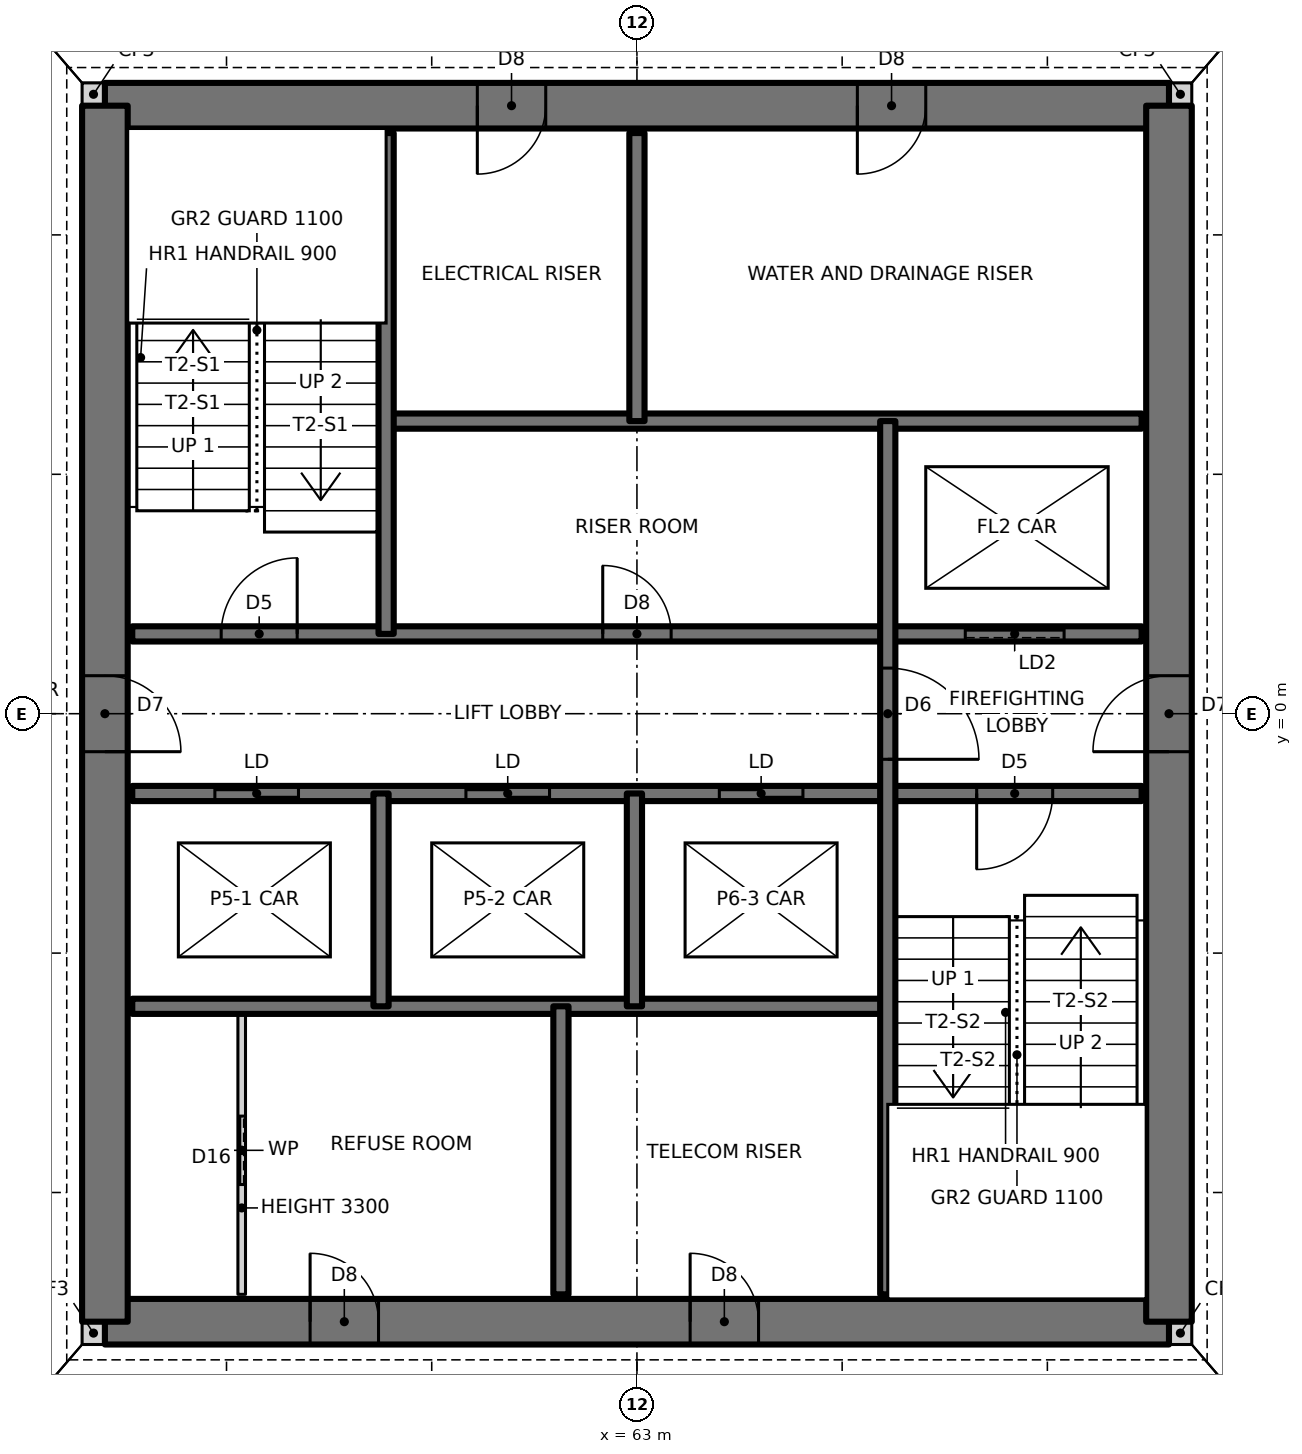
"""IFC4 building model, lengths in metres.
Left out: names, types, materials, properties, quantities, classifications, styles, units other than length and angle.
Written with IfcOpenShell. Run it as: python <this file> out.ifc"""

import sys

from ifc_helpers import new_model, si_unit, direction, frame, frame_2d, origin, place, context, subcontext, project, spatial, rectangle, extrude, element, fill, save


model = new_model("IFC4")
c1 = context("Model", 3, precision=1e-05, world=origin(), true_north=direction((0.0, 1.0)))
c2 = subcontext(c1, "Body", "Model", "MODEL_VIEW")
j1 = project(units=[si_unit("LENGTHUNIT", "METRE"), si_unit("PLANEANGLEUNIT", "RADIAN")], contexts=[c1])
p1 = place(None, origin())
s1 = spatial("IfcSite", under=j1, at=p1, CompositionType="ELEMENT")
p2 = place(p1, origin())
s2 = spatial("IfcBuilding", under=s1, at=p2, CompositionType="ELEMENT")
p3 = place(p2, frame((0.0, 0.0, 15.0)))
s3 = spatial("IfcBuildingStorey", under=s2, at=p3, CompositionType="ELEMENT", Elevation=15.0)
for number, where, z_axis, x_axis in (
    (1, (55.7, -8.15, 0.0), (0.0, 0.0, 1.0), (1.0, 0.0, 0.0)),
    (2, (70.0, -8.15, 0.0), (0.0, 0.0, 1.0), (1.0, 0.0, 0.0)),
    (3, (70.0, 8.15, 0.0), (0.0, 0.0, 1.0), (1.0, 0.0, 0.0)),
    (4, (55.7, 8.15, 0.0), (0.0, 0.0, 1.0), (1.0, 0.0, 0.0)),
):
    element("IfcWall", number, at=place(p3, frame(where, z_axis=z_axis, x_axis=x_axis)), inside=s3, PredefinedType="SOLIDWALL", context=c2, shape_type="SweptSolid", body=[
        extrude(rectangle(XDim=0.3, YDim=0.3, at=frame_2d((0.15, 0.0))), origin(), (0.0, 0.0, 1.0), 3.5),
    ])
p4 = place(p3, frame((56.0, -8.0, 0.0), z_axis=(0.0, 0.0, 1.0), x_axis=(1.0, 0.0, 0.0)))
e5 = element("IfcWall", 5, at=p4, inside=s3, PredefinedType="SHEAR", context=c2, shape_type="SweptSolid", body=[
    extrude(rectangle(XDim=14.0, YDim=0.6, at=frame_2d((7.0, 0.0))), origin(), (0.0, 0.0, 1.0), 3.5),
])
p5 = place(p4, frame((2.7, 0.0, 0.0)))
e6 = element("IfcOpeningElement", 6, at=p5, cuts=e5, PredefinedType="OPENING", context=c2, shape_type="SweptSolid", body=[
    extrude(rectangle(XDim=0.9, YDim=2.1, at=frame_2d((0.45, 1.05))), frame((0.0, 0.31, 0.0), z_axis=(0.0, -1.0, 0.0), x_axis=(1.0, 0.0, 0.0)), (0.0, 0.0, 1.0), 0.62),
])
p6 = place(p4, frame((7.7, 0.0, 0.0)))
e7 = element("IfcOpeningElement", 7, at=p6, cuts=e5, PredefinedType="OPENING", context=c2, shape_type="SweptSolid", body=[
    extrude(rectangle(XDim=0.9, YDim=2.1, at=frame_2d((0.45, 1.05))), frame((0.0, 0.31, 0.0), z_axis=(0.0, -1.0, 0.0), x_axis=(1.0, 0.0, 0.0)), (0.0, 0.0, 1.0), 0.62),
])
p7 = place(p3, frame((70.0, 8.0, 0.0), z_axis=(0.0, 0.0, 1.0), x_axis=(-1.0, 0.0, 0.0)))
e8 = element("IfcWall", 8, at=p7, inside=s3, PredefinedType="SHEAR", context=c2, shape_type="SweptSolid", body=[
    extrude(rectangle(XDim=14.0, YDim=0.6, at=frame_2d((7.0, 0.0))), origin(), (0.0, 0.0, 1.0), 3.5),
])
p8 = place(p7, frame((8.2, 0.0, 0.0)))
e9 = element("IfcOpeningElement", 9, at=p8, cuts=e8, PredefinedType="OPENING", context=c2, shape_type="SweptSolid", body=[
    extrude(rectangle(XDim=0.9, YDim=2.1, at=frame_2d((0.45, 1.05))), frame((0.0, 0.31, 0.0), z_axis=(0.0, -1.0, 0.0), x_axis=(1.0, 0.0, 0.0)), (0.0, 0.0, 1.0), 0.62),
])
p9 = place(p7, frame((3.2, 0.0, 0.0)))
e10 = element("IfcOpeningElement", 10, at=p9, cuts=e8, PredefinedType="OPENING", context=c2, shape_type="SweptSolid", body=[
    extrude(rectangle(XDim=0.9, YDim=2.1, at=frame_2d((0.45, 1.05))), frame((0.0, 0.31, 0.0), z_axis=(0.0, -1.0, 0.0), x_axis=(1.0, 0.0, 0.0)), (0.0, 0.0, 1.0), 0.62),
])
p10 = place(p3, frame((70.0, -8.0, 0.0), z_axis=(0.0, 0.0, 1.0), x_axis=(0.0, 1.0, 0.0)))
e11 = element("IfcWall", 11, at=p10, inside=s3, PredefinedType="SHEAR", context=c2, shape_type="SweptSolid", body=[
    extrude(rectangle(XDim=16.0, YDim=0.6, at=frame_2d((8.0, 0.0))), origin(), (0.0, 0.0, 1.0), 3.5),
])
p11 = place(p10, frame((7.5, 0.0, 0.0)))
e12 = element("IfcOpeningElement", 12, at=p11, cuts=e11, PredefinedType="OPENING", context=c2, shape_type="SweptSolid", body=[
    extrude(rectangle(XDim=1.0, YDim=2.1, at=frame_2d((0.5, 1.05))), frame((0.0, 0.31, 0.0), z_axis=(0.0, -1.0, 0.0), x_axis=(1.0, 0.0, 0.0)), (0.0, 0.0, 1.0), 0.62),
])
p12 = place(p3, frame((56.0, 8.0, 0.0), z_axis=(0.0, 0.0, 1.0), x_axis=(0.0, -1.0, 0.0)))
e13 = element("IfcWall", 13, at=p12, inside=s3, PredefinedType="SHEAR", context=c2, shape_type="SweptSolid", body=[
    extrude(rectangle(XDim=16.0, YDim=0.6, at=frame_2d((8.0, 0.0))), origin(), (0.0, 0.0, 1.0), 3.5),
])
p13 = place(p12, frame((7.5, 0.0, 0.0)))
e14 = element("IfcOpeningElement", 14, at=p13, cuts=e13, PredefinedType="OPENING", context=c2, shape_type="SweptSolid", body=[
    extrude(rectangle(XDim=1.0, YDim=2.1, at=frame_2d((0.5, 1.05))), frame((0.0, 0.31, 0.0), z_axis=(0.0, -1.0, 0.0), x_axis=(1.0, 0.0, 0.0)), (0.0, 0.0, 1.0), 0.62),
])
p14 = place(p3, frame((56.36, -3.85, 0.0), z_axis=(0.0, 0.0, 1.0), x_axis=(1.0, 0.0, 0.0)))
e15 = element("IfcWall", 15, at=p14, inside=s3, PredefinedType="SOLIDWALL", context=c2, shape_type="SweptSolid", body=[
    extrude(rectangle(XDim=9.94, YDim=0.2, at=frame_2d((4.97, 0.0))), origin(), (0.0, 0.0, 1.0), 3.5),
])
p15 = place(p3, frame((56.36, -1.05, 0.0), z_axis=(0.0, 0.0, 1.0), x_axis=(1.0, 0.0, 0.0)))
e16 = element("IfcWall", 16, at=p15, inside=s3, PredefinedType="SOLIDWALL", context=c2, shape_type="SweptSolid", body=[
    extrude(rectangle(XDim=13.28, YDim=0.2, at=frame_2d((6.64, 0.0))), origin(), (0.0, 0.0, 1.0), 3.5),
])
p16 = place(p15, frame((11.11, 0.0, 0.0)))
e17 = element("IfcOpeningElement", 17, at=p16, cuts=e16, PredefinedType="OPENING", context=c2, shape_type="SweptSolid", body=[
    extrude(rectangle(XDim=1.0, YDim=2.1, at=frame_2d((0.5, 1.05))), frame((0.0, 0.11, 0.0), z_axis=(0.0, -1.0, 0.0), x_axis=(1.0, 0.0, 0.0)), (0.0, 0.0, 1.0), 0.22),
])
p17 = place(p15, frame((1.087, 0.0, 0.0)))
e18 = element("IfcOpeningElement", 18, at=p17, cuts=e16, PredefinedType="OPENING", context=c2, shape_type="SweptSolid", body=[
    extrude(rectangle(XDim=1.1, YDim=2.1, at=frame_2d((0.55, 1.05))), frame((0.0, 0.11, 0.0), z_axis=(0.0, -1.0, 0.0), x_axis=(1.0, 0.0, 0.0)), (0.0, 0.0, 1.0), 0.22),
])
p18 = place(p15, frame((4.39, 0.0, 0.0)))
e19 = element("IfcOpeningElement", 19, at=p18, cuts=e16, PredefinedType="OPENING", context=c2, shape_type="SweptSolid", body=[
    extrude(rectangle(XDim=1.1, YDim=2.1, at=frame_2d((0.55, 1.05))), frame((0.0, 0.11, 0.0), z_axis=(0.0, -1.0, 0.0), x_axis=(1.0, 0.0, 0.0)), (0.0, 0.0, 1.0), 0.22),
])
p19 = place(p15, frame((7.724, 0.0, 0.0)))
e20 = element("IfcOpeningElement", 20, at=p19, cuts=e16, PredefinedType="OPENING", context=c2, shape_type="SweptSolid", body=[
    extrude(rectangle(XDim=1.1, YDim=2.1, at=frame_2d((0.55, 1.05))), frame((0.0, 0.11, 0.0), z_axis=(0.0, -1.0, 0.0), x_axis=(1.0, 0.0, 0.0)), (0.0, 0.0, 1.0), 0.22),
])
p20 = place(p3, frame((56.36, 1.05, 0.0), z_axis=(0.0, 0.0, 1.0), x_axis=(1.0, 0.0, 0.0)))
e21 = element("IfcWall", 21, at=p20, inside=s3, PredefinedType="SOLIDWALL", context=c2, shape_type="SweptSolid", body=[
    extrude(rectangle(XDim=13.28, YDim=0.2, at=frame_2d((6.64, 0.0))), origin(), (0.0, 0.0, 1.0), 3.5),
])
p21 = place(p20, frame((1.17, 0.0, 0.0)))
e22 = element("IfcOpeningElement", 22, at=p21, cuts=e21, PredefinedType="OPENING", context=c2, shape_type="SweptSolid", body=[
    extrude(rectangle(XDim=1.0, YDim=2.1, at=frame_2d((0.5, 1.05))), frame((0.0, 0.11, 0.0), z_axis=(0.0, -1.0, 0.0), x_axis=(1.0, 0.0, 0.0)), (0.0, 0.0, 1.0), 0.22),
])
p22 = place(p20, frame((6.19, 0.0, 0.0)))
e23 = element("IfcOpeningElement", 23, at=p22, cuts=e21, PredefinedType="OPENING", context=c2, shape_type="SweptSolid", body=[
    extrude(rectangle(XDim=0.9, YDim=2.1, at=frame_2d((0.45, 1.05))), frame((0.0, 0.11, 0.0), z_axis=(0.0, -1.0, 0.0), x_axis=(1.0, 0.0, 0.0)), (0.0, 0.0, 1.0), 0.22),
])
p23 = place(p20, frame((10.96, 0.0, 0.0)))
e24 = element("IfcOpeningElement", 24, at=p23, cuts=e21, PredefinedType="OPENING", context=c2, shape_type="SweptSolid", body=[
    extrude(rectangle(XDim=1.3, YDim=2.1, at=frame_2d((0.65, 1.05))), frame((0.0, 0.11, 0.0), z_axis=(0.0, -1.0, 0.0), x_axis=(1.0, 0.0, 0.0)), (0.0, 0.0, 1.0), 0.22),
])
p24 = place(p3, frame((59.7, 3.85, 0.0), z_axis=(0.0, 0.0, 1.0), x_axis=(1.0, 0.0, 0.0)))
e25 = element("IfcWall", 25, at=p24, inside=s3, PredefinedType="SOLIDWALL", context=c2, shape_type="SweptSolid", body=[
    extrude(rectangle(XDim=9.94, YDim=0.2, at=frame_2d((4.97, 0.0))), origin(), (0.0, 0.0, 1.0), 3.5),
])
p25 = place(p3, frame((66.3, -7.64, 0.0), z_axis=(0.0, 0.0, 1.0), x_axis=(0.0, 1.0, 0.0)))
e26 = element("IfcWall", 26, at=p25, inside=s3, PredefinedType="SOLIDWALL", context=c2, shape_type="SweptSolid", body=[
    extrude(rectangle(XDim=11.49, YDim=0.2, at=frame_2d((5.745, 0.0))), origin(), (0.0, 0.0, 1.0), 3.5),
])
p26 = place(p25, frame((7.04, 0.0, 0.0)))
e27 = element("IfcOpeningElement", 27, at=p26, cuts=e26, PredefinedType="OPENING", context=c2, shape_type="SweptSolid", body=[
    extrude(rectangle(XDim=1.2, YDim=2.1, at=frame_2d((0.6, 1.05))), frame((0.0, 0.11, 0.0), z_axis=(0.0, -1.0, 0.0), x_axis=(1.0, 0.0, 0.0)), (0.0, 0.0, 1.0), 0.22),
])
p27 = place(p3, frame((63.0, 3.85, 0.0), z_axis=(0.0, 0.0, 1.0), x_axis=(0.0, 1.0, 0.0)))
e28 = element("IfcWall", 28, at=p27, inside=s3, PredefinedType="SOLIDWALL", context=c2, shape_type="SweptSolid", body=[
    extrude(rectangle(XDim=3.79, YDim=0.2, at=frame_2d((1.895, 0.0))), origin(), (0.0, 0.0, 1.0), 3.5),
])
p28 = place(p3, frame((62.967, -3.85, 0.0), z_axis=(0.0, 0.0, 1.0), x_axis=(0.0, 1.0, 0.0)))
e29 = element("IfcWall", 29, at=p28, inside=s3, PredefinedType="SOLIDWALL", context=c2, shape_type="SweptSolid", body=[
    extrude(rectangle(XDim=2.8, YDim=0.2, at=frame_2d((1.4, 0.0))), origin(), (0.0, 0.0, 1.0), 3.5),
])
p29 = place(p3, frame((62.0, -7.64, 0.0), z_axis=(0.0, 0.0, 1.0), x_axis=(0.0, 1.0, 0.0)))
e30 = element("IfcWall", 30, at=p29, inside=s3, PredefinedType="SOLIDWALL", context=c2, shape_type="SweptSolid", body=[
    extrude(rectangle(XDim=3.79, YDim=0.2, at=frame_2d((1.895, 0.0))), origin(), (0.0, 0.0, 1.0), 3.5),
])
p30 = place(p3, frame((59.7, 1.05, 0.0), z_axis=(0.0, 0.0, 1.0), x_axis=(0.0, 1.0, 0.0)))
e31 = element("IfcWall", 31, at=p30, inside=s3, PredefinedType="SOLIDWALL", context=c2, shape_type="SweptSolid", body=[
    extrude(rectangle(XDim=6.59, YDim=0.2, at=frame_2d((3.295, 0.0))), origin(), (0.0, 0.0, 1.0), 3.5),
])
p31 = place(p3, frame((59.633, -3.85, 0.0), z_axis=(0.0, 0.0, 1.0), x_axis=(0.0, 1.0, 0.0)))
e32 = element("IfcWall", 32, at=p31, inside=s3, PredefinedType="SOLIDWALL", context=c2, shape_type="SweptSolid", body=[
    extrude(rectangle(XDim=2.8, YDim=0.2, at=frame_2d((1.4, 0.0))), origin(), (0.0, 0.0, 1.0), 3.5),
])
p32 = place(p3, frame((57.8, -7.64, 0.0), z_axis=(0.0, 0.0, 1.0), x_axis=(0.0, 1.0, 0.0)))
e33 = element("IfcWall", 33, at=p32, inside=s3, PredefinedType="PARTITIONING", context=c2, shape_type="SweptSolid", body=[
    extrude(rectangle(XDim=3.79, YDim=0.1, at=frame_2d((1.895, 0.0))), origin(), (0.0, 0.0, 1.0), 3.3),
])
p33 = place(p32, frame((1.445, 0.0, 0.0)))
e34 = element("IfcOpeningElement", 34, at=p33, cuts=e33, PredefinedType="OPENING", context=c2, shape_type="SweptSolid", body=[
    extrude(rectangle(XDim=0.9, YDim=2.1, at=frame_2d((0.45, 1.05))), frame((0.0, 0.06, 0.0), z_axis=(0.0, -1.0, 0.0), x_axis=(1.0, 0.0, 0.0)), (0.0, 0.0, 1.0), 0.12),
])
p34 = place(p21, origin())
e35 = element("IfcDoor", 35, at=p34, inside=s3, OperationType="SINGLE_SWING_RIGHT", PredefinedType="DOOR", context=c2, shape_type="SweptSolid", body=[
    extrude(rectangle(XDim=1.0, YDim=2.1, at=frame_2d((0.5, 1.05))), frame((0.0, 0.025, 0.0), z_axis=(0.0, -1.0, 0.0), x_axis=(1.0, 0.0, 0.0)), (0.0, 0.0, 1.0), 0.05),
])
fill(e22, e35)
p35 = place(p16, frame((1.0, 0.0, 0.0), z_axis=(0.0, 0.0, 1.0), x_axis=(-1.0, 0.0, 0.0)))
e36 = element("IfcDoor", 36, at=p35, inside=s3, OperationType="SINGLE_SWING_RIGHT", PredefinedType="DOOR", context=c2, shape_type="SweptSolid", body=[
    extrude(rectangle(XDim=1.0, YDim=2.1, at=frame_2d((0.5, 1.05))), frame((0.0, 0.025, 0.0), z_axis=(0.0, -1.0, 0.0), x_axis=(1.0, 0.0, 0.0)), (0.0, 0.0, 1.0), 0.05),
])
fill(e17, e36)
p36 = place(p26, frame((1.2, 0.0, 0.0), z_axis=(0.0, 0.0, 1.0), x_axis=(-1.0, 0.0, 0.0)))
e37 = element("IfcDoor", 37, at=p36, inside=s3, OperationType="SINGLE_SWING_RIGHT", PredefinedType="DOOR", context=c2, shape_type="SweptSolid", body=[
    extrude(rectangle(XDim=1.2, YDim=2.1, at=frame_2d((0.6, 1.05))), frame((0.0, 0.025, 0.0), z_axis=(0.0, -1.0, 0.0), x_axis=(1.0, 0.0, 0.0)), (0.0, 0.0, 1.0), 0.05),
])
fill(e27, e37)
p37 = place(p22, origin())
e38 = element("IfcDoor", 38, at=p37, inside=s3, OperationType="SINGLE_SWING_LEFT", PredefinedType="DOOR", context=c2, shape_type="SweptSolid", body=[
    extrude(rectangle(XDim=0.9, YDim=2.1, at=frame_2d((0.45, 1.05))), frame((0.0, 0.025, 0.0), z_axis=(0.0, -1.0, 0.0), x_axis=(1.0, 0.0, 0.0)), (0.0, 0.0, 1.0), 0.05),
])
fill(e23, e38)
p38 = place(p33, origin())
e39 = element("IfcDoor", 39, at=p38, inside=s3, OperationType="SLIDING_TO_LEFT", PredefinedType="DOOR", context=c2, shape_type="SweptSolid", body=[
    extrude(rectangle(XDim=0.9, YDim=2.1, at=frame_2d((0.45, 1.05))), frame((0.0, 0.025, 0.0), z_axis=(0.0, -1.0, 0.0), x_axis=(1.0, 0.0, 0.0)), (0.0, 0.0, 1.0), 0.05),
])
fill(e34, e39)
p39 = place(p13, origin())
e40 = element("IfcDoor", 40, at=p39, inside=s3, OperationType="SINGLE_SWING_RIGHT", PredefinedType="DOOR", context=c2, shape_type="SweptSolid", body=[
    extrude(rectangle(XDim=1.0, YDim=2.1, at=frame_2d((0.5, 1.05))), frame((0.0, 0.025, 0.0), z_axis=(0.0, -1.0, 0.0), x_axis=(1.0, 0.0, 0.0)), (0.0, 0.0, 1.0), 0.05),
])
fill(e14, e40)
p40 = place(p11, origin())
e41 = element("IfcDoor", 41, at=p40, inside=s3, OperationType="SINGLE_SWING_LEFT", PredefinedType="DOOR", context=c2, shape_type="SweptSolid", body=[
    extrude(rectangle(XDim=1.0, YDim=2.1, at=frame_2d((0.5, 1.05))), frame((0.0, 0.025, 0.0), z_axis=(0.0, -1.0, 0.0), x_axis=(1.0, 0.0, 0.0)), (0.0, 0.0, 1.0), 0.05),
])
fill(e12, e41)
p41 = place(p8, origin())
e42 = element("IfcDoor", 42, at=p41, inside=s3, OperationType="SINGLE_SWING_RIGHT", PredefinedType="DOOR", context=c2, shape_type="SweptSolid", body=[
    extrude(rectangle(XDim=0.9, YDim=2.1, at=frame_2d((0.45, 1.05))), frame((0.0, 0.025, 0.0), z_axis=(0.0, -1.0, 0.0), x_axis=(1.0, 0.0, 0.0)), (0.0, 0.0, 1.0), 0.05),
])
fill(e9, e42)
p42 = place(p9, origin())
e43 = element("IfcDoor", 43, at=p42, inside=s3, OperationType="SINGLE_SWING_RIGHT", PredefinedType="DOOR", context=c2, shape_type="SweptSolid", body=[
    extrude(rectangle(XDim=0.9, YDim=2.1, at=frame_2d((0.45, 1.05))), frame((0.0, 0.025, 0.0), z_axis=(0.0, -1.0, 0.0), x_axis=(1.0, 0.0, 0.0)), (0.0, 0.0, 1.0), 0.05),
])
fill(e10, e43)
p43 = place(p5, origin())
e44 = element("IfcDoor", 44, at=p43, inside=s3, OperationType="SINGLE_SWING_LEFT", PredefinedType="DOOR", context=c2, shape_type="SweptSolid", body=[
    extrude(rectangle(XDim=0.9, YDim=2.1, at=frame_2d((0.45, 1.05))), frame((0.0, 0.025, 0.0), z_axis=(0.0, -1.0, 0.0), x_axis=(1.0, 0.0, 0.0)), (0.0, 0.0, 1.0), 0.05),
])
fill(e6, e44)
p44 = place(p6, origin())
e45 = element("IfcDoor", 45, at=p44, inside=s3, OperationType="SINGLE_SWING_LEFT", PredefinedType="DOOR", context=c2, shape_type="SweptSolid", body=[
    extrude(rectangle(XDim=0.9, YDim=2.1, at=frame_2d((0.45, 1.05))), frame((0.0, 0.025, 0.0), z_axis=(0.0, -1.0, 0.0), x_axis=(1.0, 0.0, 0.0)), (0.0, 0.0, 1.0), 0.05),
])
fill(e7, e45)
p45 = place(p17, origin())
e46 = element("IfcDoor", 46, at=p45, inside=s3, OperationType="DOUBLE_DOOR_SLIDING", PredefinedType="DOOR", context=c2, shape_type="SweptSolid", body=[
    extrude(rectangle(XDim=1.1, YDim=2.1, at=frame_2d((0.55, 1.05))), frame((0.0, 0.025, 0.0), z_axis=(0.0, -1.0, 0.0), x_axis=(1.0, 0.0, 0.0)), (0.0, 0.0, 1.0), 0.05),
])
fill(e18, e46)
p46 = place(p18, origin())
e47 = element("IfcDoor", 47, at=p46, inside=s3, OperationType="DOUBLE_DOOR_SLIDING", PredefinedType="DOOR", context=c2, shape_type="SweptSolid", body=[
    extrude(rectangle(XDim=1.1, YDim=2.1, at=frame_2d((0.55, 1.05))), frame((0.0, 0.025, 0.0), z_axis=(0.0, -1.0, 0.0), x_axis=(1.0, 0.0, 0.0)), (0.0, 0.0, 1.0), 0.05),
])
fill(e19, e47)
p47 = place(p19, origin())
e48 = element("IfcDoor", 48, at=p47, inside=s3, OperationType="DOUBLE_DOOR_SLIDING", PredefinedType="DOOR", context=c2, shape_type="SweptSolid", body=[
    extrude(rectangle(XDim=1.1, YDim=2.1, at=frame_2d((0.55, 1.05))), frame((0.0, 0.025, 0.0), z_axis=(0.0, -1.0, 0.0), x_axis=(1.0, 0.0, 0.0)), (0.0, 0.0, 1.0), 0.05),
])
fill(e20, e48)
p48 = place(p23, origin())
e49 = element("IfcDoor", 49, at=p48, inside=s3, OperationType="SLIDING_TO_LEFT", PredefinedType="DOOR", context=c2, shape_type="SweptSolid", body=[
    extrude(rectangle(XDim=1.3, YDim=2.1, at=frame_2d((0.65, 1.05))), frame((0.0, 0.025, 0.0), z_axis=(0.0, -1.0, 0.0), x_axis=(1.0, 0.0, 0.0)), (0.0, 0.0, 1.0), 0.05),
])
fill(e24, e49)
save(model, sys.argv[1])
